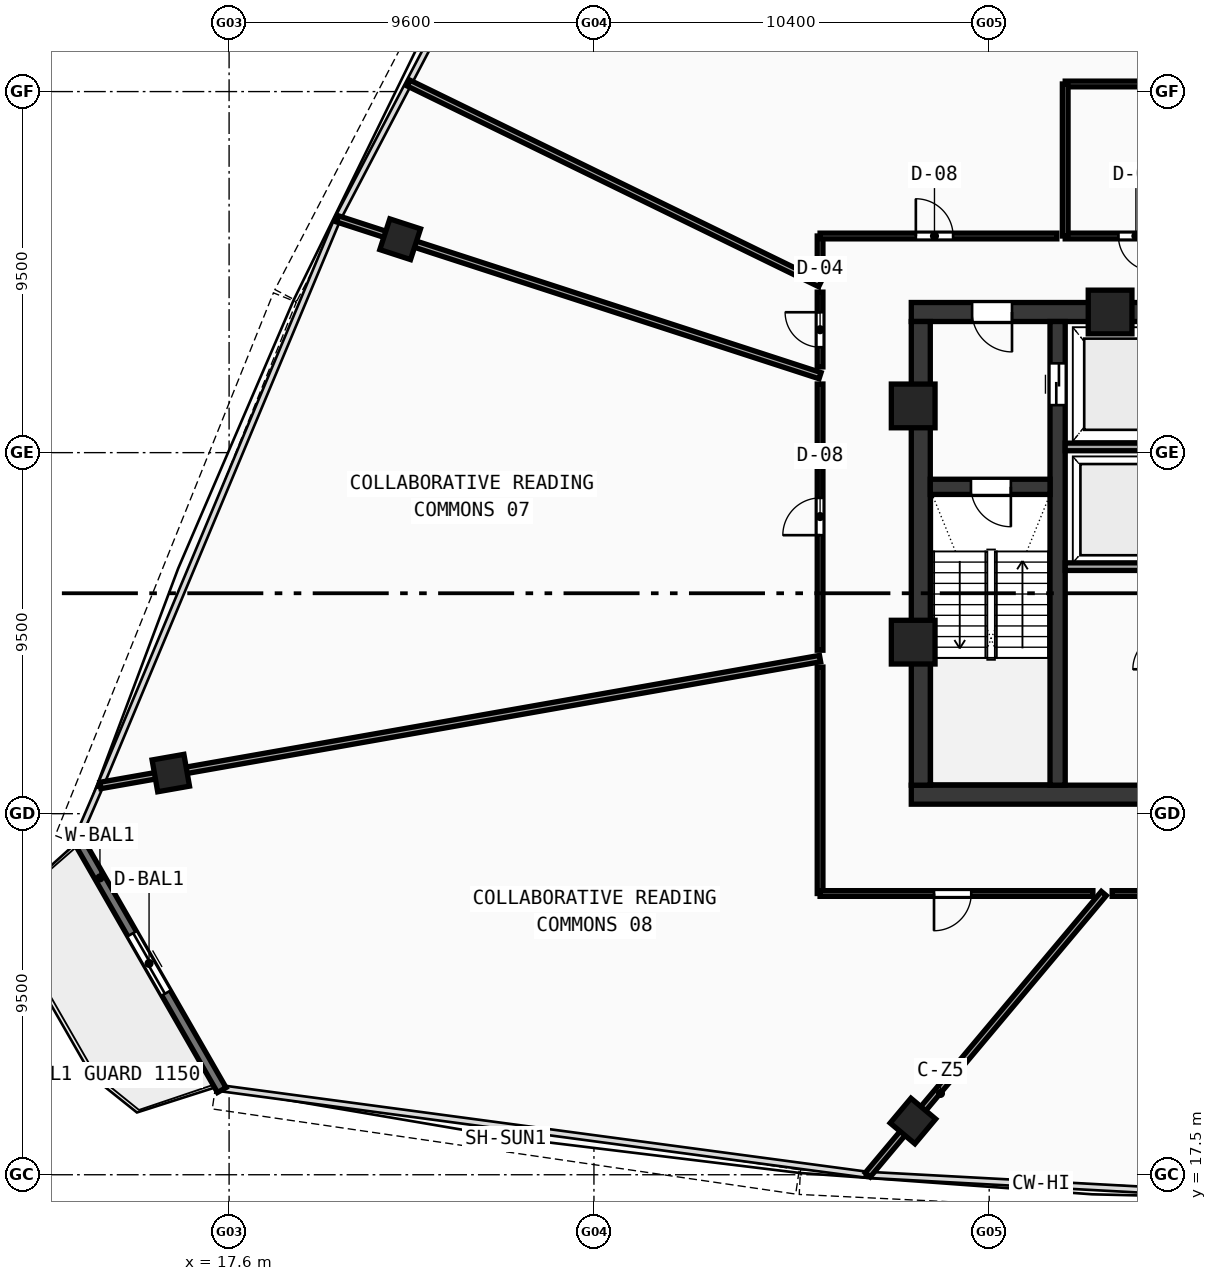
"""IFC4 building model, lengths in metres.
Left out: names, types, materials, properties, quantities, classifications, styles, units other than length and angle.
Written with IfcOpenShell. Run it as: python <this file> out.ifc"""

import sys

from ifc_helpers import new_model, si_unit, direction, frame, frame_2d, origin, origin_with_axes, origin_2d, place, context, subcontext, project, spatial, rectangle, hollow_rectangle, extrude, source, transform, mapped, element, fill, save


model = new_model("IFC4")
c1 = context("Model", 3, precision=1e-05, world=origin(), true_north=direction((0.0, 1.0)))
c2 = subcontext(c1, "Body", "Model", "MODEL_VIEW")
j1 = project(units=[si_unit("LENGTHUNIT", "METRE"), si_unit("PLANEANGLEUNIT", "RADIAN")], contexts=[c1])
p1 = place(None, origin())
s1 = spatial("IfcSite", under=j1, at=p1, CompositionType="ELEMENT")
p2 = place(p1, origin())
s2 = spatial("IfcBuilding", under=s1, at=p2, CompositionType="ELEMENT")
p3 = place(p2, frame((0.0, 0.0, 251.99)))
s3 = spatial("IfcBuildingStorey", under=s2, at=p3, CompositionType="ELEMENT", Elevation=251.99)
p4 = place(p3, frame((35.55, 27.5, 0.0), z_axis=(0.0, 0.0, 1.0), x_axis=(1.0, 0.0, 0.0)))
e1 = element("IfcWall", 1, at=p4, inside=s3, PredefinedType="SHEAR", context=c2, shape_type="SweptSolid", body=[
    extrude(rectangle(XDim=24.9, YDim=0.5, at=frame_2d((12.45, 0.0))), origin(), (0.0, 0.0, 1.0), 3.47),
])
p5 = place(p3, frame((35.55, 40.2, 0.0), z_axis=(0.0, 0.0, 1.0), x_axis=(1.0, 0.0, 0.0)))
e2 = element("IfcWall", 2, at=p5, inside=s3, PredefinedType="SHEAR", context=c2, shape_type="SweptSolid", body=[
    extrude(rectangle(XDim=11.25, YDim=0.5, at=frame_2d((5.625, 0.0))), origin(), (0.0, 0.0, 1.0), 3.47),
])
p6 = place(p5, frame((1.6, 0.0, 0.0)))
e3 = element("IfcOpeningElement", 3, at=p6, cuts=e2, PredefinedType="OPENING", context=c2, shape_type="SweptSolid", body=[
    extrude(rectangle(XDim=1.05, YDim=2.1, at=frame_2d((0.525, 1.05))), frame((0.0, 0.26, 0.0), z_axis=(0.0, -1.0, 0.0), x_axis=(1.0, 0.0, 0.0)), (0.0, 0.0, 1.0), 0.52),
])
p7 = place(p3, frame((35.8, 27.75, 0.0), z_axis=(0.0, 0.0, 1.0), x_axis=(0.0, 1.0, 0.0)))
e4 = element("IfcWall", 4, at=p7, inside=s3, PredefinedType="SHEAR", context=c2, shape_type="SweptSolid", body=[
    extrude(rectangle(XDim=12.2, YDim=0.5, at=frame_2d((6.1, 0.0))), origin(), (0.0, 0.0, 1.0), 3.47),
])
p8 = place(p3, frame((39.4, 27.75, 0.0), z_axis=(0.0, 0.0, 1.0), x_axis=(0.0, 1.0, 0.0)))
e5 = element("IfcWall", 5, at=p8, inside=s3, PredefinedType="SHEAR", context=c2, shape_type="SweptSolid", body=[
    extrude(rectangle(XDim=12.2, YDim=0.4, at=frame_2d((6.1, 0.0))), origin(), (0.0, 0.0, 1.0), 3.47),
])
p9 = place(p8, frame((10.0, 0.0, 0.0)))
e6 = element("IfcOpeningElement", 6, at=p9, cuts=e5, PredefinedType="OPENING", context=c2, shape_type="SweptSolid", body=[
    extrude(rectangle(XDim=1.1, YDim=2.1, at=frame_2d((0.55, 1.05))), frame((0.0, 0.21, 0.0), z_axis=(0.0, -1.0, 0.0), x_axis=(1.0, 0.0, 0.0)), (0.0, 0.0, 1.0), 0.42),
])
p10 = place(p3, frame((36.05, 35.6, 0.0), z_axis=(0.0, 0.0, 1.0), x_axis=(1.0, 0.0, 0.0)))
e7 = element("IfcWall", 7, at=p10, inside=s3, PredefinedType="SHEAR", context=c2, shape_type="SweptSolid", body=[
    extrude(rectangle(XDim=3.15, YDim=0.4, at=frame_2d((1.575, 0.0))), origin(), (0.0, 0.0, 1.0), 3.47),
])
p11 = place(p10, frame((1.07, 0.0, 0.0)))
e8 = element("IfcOpeningElement", 8, at=p11, cuts=e7, PredefinedType="OPENING", context=c2, shape_type="SweptSolid", body=[
    extrude(rectangle(XDim=1.05, YDim=2.1, at=frame_2d((0.525, 1.05))), frame((0.0, 0.21, 0.0), z_axis=(0.0, -1.0, 0.0), x_axis=(1.0, 0.0, 0.0)), (0.0, 0.0, 1.0), 0.42),
])
m1 = source(origin(), c2, "Body", "SweptSolid", [
    extrude(hollow_rectangle(XDim=1.15, YDim=1.15, WallThickness=0.048, at=origin_2d()), origin(), (0.0, 0.0, 1.0), 3.73),
])
for number, where, z_axis, x_axis in (
    (9, (40.781, 40.2, -0.26), (0.0, 0.0, 1.0), (1.0, 0.0, 0.0)),
    (10, (35.6, 37.729, -0.26), (0.0, 0.0, 1.0), (1.0, 0.0, 0.0)),
    (11, (35.6, 31.513, -0.26), (0.0, 0.0, 1.0), (1.0, 0.0, 0.0)),
):
    element("IfcColumn", number, at=place(p3, frame(where, z_axis=z_axis, x_axis=x_axis)), inside=s3, PredefinedType="COLUMN", context=c2, shape_type="MappedRepresentation", body=[
        mapped(m1, transform((0.0, 0.0, 0.0), scale=1.0)),
    ])
m2 = source(origin(), c2, "Body", "SweptSolid", [
    extrude(hollow_rectangle(XDim=0.85, YDim=0.85, WallThickness=0.034, at=origin_2d()), origin(), (0.0, 0.0, 1.0), 3.73),
])
for number, where, z_axis, x_axis in (
    (12, (35.593, 18.914, -0.26), (0.0, 0.0, 1.0), (0.766, -0.643, 0.0)),
    (13, (22.102, 42.115, -0.26), (0.0, 0.0, 1.0), (-0.309, -0.951, 0.0)),
    (14, (16.066, 28.069, -0.26), (0.0, 0.0, 1.0), (0.174, -0.985, 0.0)),
):
    element("IfcColumn", number, at=place(p3, frame(where, z_axis=z_axis, x_axis=x_axis)), inside=s3, PredefinedType="COLUMN", context=c2, shape_type="MappedRepresentation", body=[
        mapped(m2, transform((0.0, 0.0, 0.0), scale=1.0)),
    ])
p12 = place(p3, frame((13.581, 26.392, 0.0), z_axis=(0.0, 0.0, 1.0), x_axis=(0.497934343816, -0.867214730761, 0.0)))
e15 = element("IfcWall", 15, at=p12, inside=s3, PredefinedType="STANDARD", context=c2, shape_type="SweptSolid", body=[
    extrude(rectangle(XDim=7.684, YDim=0.26, at=frame_2d((3.842, 0.0))), origin(), (0.0, 0.0, 1.0), 3.47),
])
p13 = place(p12, frame((2.942, 0.0, 0.0)))
e16 = element("IfcOpeningElement", 16, at=p13, cuts=e15, PredefinedType="OPENING", context=c2, shape_type="SweptSolid", body=[
    extrude(rectangle(XDim=1.8, YDim=2.15, at=frame_2d((0.9, 1.075))), frame((0.0, 0.14, 0.0), z_axis=(0.0, -1.0, 0.0), x_axis=(1.0, 0.0, 0.0)), (0.0, 0.0, 1.0), 0.28),
])
for number, where, z_axis, x_axis in (
    (17, (39.6, 36.65, 0.0), (0.0, 0.0, 1.0), (1.0, 0.0, 0.0)),
    (18, (39.6, 33.5, 0.0), (0.0, 0.0, 1.0), (1.0, 0.0, 0.0)),
):
    element("IfcWall", number, at=place(p3, frame(where, z_axis=z_axis, x_axis=x_axis)), inside=s3, PredefinedType="SOLIDWALL", context=c2, shape_type="SweptSolid", body=[
        extrude(rectangle(XDim=2.72, YDim=0.2, at=frame_2d((1.36, 0.0))), origin(), (0.0, 0.0, 1.0), 3.47),
    ])
p14 = place(p3, frame((39.6, 42.2, 0.0), z_axis=(0.0, 0.0, 1.0), x_axis=(1.0, 0.0, 0.0)))
e19 = element("IfcWall", 19, at=p14, inside=s3, PredefinedType="PARTITIONING", context=c2, shape_type="SweptSolid", body=[
    extrude(rectangle(XDim=4.35, YDim=0.15, at=frame_2d((2.175, 0.0))), origin(), (0.0, 0.0, 1.0), 3.47),
])
p15 = place(p14, frame((1.4, 0.0, 0.0)))
e20 = element("IfcOpeningElement", 20, at=p15, cuts=e19, PredefinedType="OPENING", context=c2, shape_type="SweptSolid", body=[
    extrude(rectangle(XDim=0.92, YDim=2.1, at=frame_2d((0.46, 1.05))), frame((0.0, 0.085, 0.0), z_axis=(0.0, -1.0, 0.0), x_axis=(1.0, 0.0, 0.0)), (0.0, 0.0, 1.0), 0.17),
])
p16 = place(p3, frame((39.6, 46.2, 0.0), z_axis=(0.0, 0.0, 1.0), x_axis=(1.0, 0.0, 0.0)))
e21 = element("IfcWall", 21, at=p16, inside=s3, PredefinedType="PARTITIONING", context=c2, shape_type="SweptSolid", body=[
    extrude(rectangle(XDim=4.35, YDim=0.15, at=frame_2d((2.175, 0.0))), origin(), (0.0, 0.0, 1.0), 2.82),
])
p17 = place(p3, frame((39.6, 42.2, 0.0), z_axis=(0.0, 0.0, 1.0), x_axis=(0.0, 1.0, 0.0)))
e22 = element("IfcWall", 22, at=p17, inside=s3, PredefinedType="PARTITIONING", context=c2, shape_type="SweptSolid", body=[
    extrude(rectangle(XDim=4.0, YDim=0.15, at=frame_2d((2.0, 0.0))), origin(), (0.0, 0.0, 1.0), 3.47),
])
p18 = place(p3, frame((42.435, 46.2, 0.0), z_axis=(0.0, 0.0, 1.0), x_axis=(-0.406732494706, 0.913547304605, 0.0)))
e23 = element("IfcWall", 23, at=p18, inside=s3, PredefinedType="PARTITIONING", context=c2, shape_type="SweptSolid", body=[
    extrude(rectangle(XDim=21.123, YDim=0.17, at=frame_2d((10.562, 0.0))), origin(), (0.0, 0.0, 1.0), 2.82),
])
p19 = place(p3, frame((33.15, 40.943, 0.0), z_axis=(0.0, 0.0, 1.0), x_axis=(-0.89879494126, 0.438369311842, 0.0)))
e24 = element("IfcWall", 24, at=p19, inside=s3, PredefinedType="PARTITIONING", context=c2, shape_type="SweptSolid", body=[
    extrude(rectangle(XDim=12.043, YDim=0.17, at=frame_2d((6.021, 0.0))), origin(), (0.0, 0.0, 1.0), 2.82),
])
p20 = place(p3, frame((33.15, 38.525, 0.0), z_axis=(0.0, 0.0, 1.0), x_axis=(-0.951055435747, 0.30902031994, 0.0)))
e25 = element("IfcWall", 25, at=p20, inside=s3, PredefinedType="PARTITIONING", context=c2, shape_type="SweptSolid", body=[
    extrude(rectangle(XDim=13.349, YDim=0.17, at=frame_2d((6.675, 0.0))), origin(), (0.0, 0.0, 1.0), 2.82),
])
p21 = place(p3, frame((33.15, 31.082, 0.0), z_axis=(0.0, 0.0, 1.0), x_axis=(-0.984808346381, -0.173644812474, 0.0)))
e26 = element("IfcWall", 26, at=p21, inside=s3, PredefinedType="PARTITIONING", context=c2, shape_type="SweptSolid", body=[
    extrude(rectangle(XDim=19.228, YDim=0.17, at=frame_2d((9.614, 0.0))), origin(), (0.0, 0.0, 1.0), 2.82),
])
p22 = place(p3, frame((40.616, 24.9, 0.0), z_axis=(0.0, 0.0, 1.0), x_axis=(-0.642795010628, -0.766038232931, 0.0)))
e27 = element("IfcWall", 27, at=p22, inside=s3, PredefinedType="PARTITIONING", context=c2, shape_type="SweptSolid", body=[
    extrude(rectangle(XDim=9.663, YDim=0.17, at=frame_2d((4.832, 0.0))), origin(), (0.0, 0.0, 1.0), 2.82),
])
p23 = place(p3, frame((33.15, 24.9, 0.0), z_axis=(0.0, 0.0, 1.0), x_axis=(0.0, 1.0, 0.0)))
e28 = element("IfcWall", 28, at=p23, inside=s3, PredefinedType="PARTITIONING", context=c2, shape_type="SweptSolid", body=[
    extrude(rectangle(XDim=5.958, YDim=0.15, at=frame_2d((2.979, 0.0))), origin(), (0.0, 0.0, 1.0), 3.12),
])
p24 = place(p3, frame((33.15, 31.301, 0.0), z_axis=(0.0, 0.0, 1.0), x_axis=(0.0, 1.0, 0.0)))
e29 = element("IfcWall", 29, at=p24, inside=s3, PredefinedType="PARTITIONING", context=c2, shape_type="SweptSolid", body=[
    extrude(rectangle(XDim=7.004, YDim=0.15, at=frame_2d((3.502, 0.0))), origin(), (0.0, 0.0, 1.0), 3.47),
])
p25 = place(p24, frame((3.027, 0.0, 0.0)))
e30 = element("IfcOpeningElement", 30, at=p25, cuts=e29, PredefinedType="OPENING", context=c2, shape_type="SweptSolid", body=[
    extrude(rectangle(XDim=0.98, YDim=2.12, at=frame_2d((0.49, 1.06))), frame((0.0, 0.085, 0.0), z_axis=(0.0, -1.0, 0.0), x_axis=(1.0, 0.0, 0.0)), (0.0, 0.0, 1.0), 0.17),
])
p26 = place(p3, frame((33.15, 38.756, 0.0), z_axis=(0.0, 0.0, 1.0), x_axis=(0.0, 1.0, 0.0)))
e31 = element("IfcWall", 31, at=p26, inside=s3, PredefinedType="PARTITIONING", context=c2, shape_type="SweptSolid", body=[
    extrude(rectangle(XDim=1.967, YDim=0.15, at=frame_2d((0.983, 0.0))), origin(), (0.0, 0.0, 1.0), 3.47),
])
p27 = place(p26, frame((0.518, 0.0, 0.0)))
e32 = element("IfcOpeningElement", 32, at=p27, cuts=e31, PredefinedType="OPENING", context=c2, shape_type="SweptSolid", body=[
    extrude(rectangle(XDim=0.92, YDim=2.1, at=frame_2d((0.46, 1.05))), frame((0.0, 0.085, 0.0), z_axis=(0.0, -1.0, 0.0), x_axis=(1.0, 0.0, 0.0)), (0.0, 0.0, 1.0), 0.17),
])
p28 = place(p3, frame((33.15, 41.188, 0.0), z_axis=(0.0, 0.0, 1.0), x_axis=(0.0, 1.0, 0.0)))
e33 = element("IfcWall", 33, at=p28, inside=s3, PredefinedType="PARTITIONING", context=c2, shape_type="SweptSolid", body=[
    extrude(rectangle(XDim=1.012, YDim=0.15, at=frame_2d((0.506, 0.0))), origin(), (0.0, 0.0, 1.0), 3.12),
])
p29 = place(p3, frame((33.15, 42.2, 0.0), z_axis=(0.0, 0.0, 1.0), x_axis=(1.0, 0.0, 0.0)))
e34 = element("IfcWall", 34, at=p29, inside=s3, PredefinedType="PARTITIONING", context=c2, shape_type="SweptSolid", body=[
    extrude(rectangle(XDim=6.23, YDim=0.15, at=frame_2d((3.115, 0.0))), origin(), (0.0, 0.0, 1.0), 2.82),
])
p30 = place(p29, frame((2.52, 0.0, 0.0)))
e35 = element("IfcOpeningElement", 35, at=p30, cuts=e34, PredefinedType="OPENING", context=c2, shape_type="SweptSolid", body=[
    extrude(rectangle(XDim=0.98, YDim=2.12, at=frame_2d((0.49, 1.06))), frame((0.0, 0.085, 0.0), z_axis=(0.0, -1.0, 0.0), x_axis=(1.0, 0.0, 0.0)), (0.0, 0.0, 1.0), 0.17),
])
p31 = place(p3, frame((45.414, 24.9, 0.0), z_axis=(0.0, 0.0, 1.0), x_axis=(-1.0, 0.0, 0.0)))
e36 = element("IfcWall", 36, at=p31, inside=s3, PredefinedType="PARTITIONING", context=c2, shape_type="SweptSolid", body=[
    extrude(rectangle(XDim=4.579, YDim=0.15, at=frame_2d((2.289, 0.0))), origin(), (0.0, 0.0, 1.0), 2.82),
])
p32 = place(p31, frame((1.81, 0.0, 0.0)))
e37 = element("IfcOpeningElement", 37, at=p32, cuts=e36, PredefinedType="OPENING", context=c2, shape_type="SweptSolid", body=[
    extrude(rectangle(XDim=0.98, YDim=2.12, at=frame_2d((0.49, 1.06))), frame((0.0, 0.085, 0.0), z_axis=(0.0, -1.0, 0.0), x_axis=(1.0, 0.0, 0.0)), (0.0, 0.0, 1.0), 0.17),
])
p33 = place(p3, frame((40.329, 24.9, 0.0), z_axis=(0.0, 0.0, 1.0), x_axis=(-1.0, 0.0, 0.0)))
e38 = element("IfcWall", 38, at=p33, inside=s3, PredefinedType="PARTITIONING", context=c2, shape_type="SweptSolid", body=[
    extrude(rectangle(XDim=7.179, YDim=0.15, at=frame_2d((3.589, 0.0))), origin(), (0.0, 0.0, 1.0), 3.12),
])
p34 = place(p33, frame((3.201, 0.0, 0.0)))
e39 = element("IfcOpeningElement", 39, at=p34, cuts=e38, PredefinedType="OPENING", context=c2, shape_type="SweptSolid", body=[
    extrude(rectangle(XDim=0.98, YDim=2.12, at=frame_2d((0.49, 1.06))), frame((0.0, 0.085, 0.0), z_axis=(0.0, -1.0, 0.0), x_axis=(1.0, 0.0, 0.0)), (0.0, 0.0, 1.0), 0.17),
])
m3 = source(origin(), c2, "Body", "SweptSolid", [
    extrude(rectangle(XDim=1.8, YDim=2.15, at=frame_2d((0.9, 1.075))), frame((0.0, 0.025, 0.0), z_axis=(0.0, -1.0, 0.0), x_axis=(1.0, 0.0, 0.0)), (0.0, 0.0, 1.0), 0.05),
])
p35 = place(p13, origin_with_axes())
e40 = element("IfcDoor", 40, at=p35, inside=s3, OperationType="DOUBLE_DOOR_SLIDING", PredefinedType="DOOR", context=c2, shape_type="MappedRepresentation", body=[
    mapped(m3, transform((0.0, 0.0, 0.0), scale=1.0)),
])
fill(e16, e40)
m4 = source(origin(), c2, "Body", "SweptSolid", [
    extrude(rectangle(XDim=1.05, YDim=2.1, at=frame_2d((0.525, 1.05))), frame((0.0, 0.025, 0.0), z_axis=(0.0, -1.0, 0.0), x_axis=(1.0, 0.0, 0.0)), (0.0, 0.0, 1.0), 0.05),
])
p36 = place(p11, frame((1.05, 0.0, 0.0), z_axis=(0.0, 0.0, 1.0), x_axis=(-1.0, 0.0, 0.0)))
e41 = element("IfcDoor", 41, at=p36, inside=s3, OperationType="SINGLE_SWING_LEFT", PredefinedType="DOOR", context=c2, shape_type="MappedRepresentation", body=[
    mapped(m4, transform((0.0, 0.0, 0.0), scale=1.0)),
])
fill(e8, e41)
p37 = place(p6, frame((1.05, 0.0, 0.0), z_axis=(0.0, 0.0, 1.0), x_axis=(-1.0, 0.0, 0.0)))
e42 = element("IfcDoor", 42, at=p37, inside=s3, OperationType="SINGLE_SWING_LEFT", PredefinedType="DOOR", context=c2, shape_type="MappedRepresentation", body=[
    mapped(m4, transform((0.0, 0.0, 0.0), scale=1.0)),
])
fill(e3, e42)
m5 = source(origin(), c2, "Body", "SweptSolid", [
    extrude(rectangle(XDim=1.1, YDim=2.1, at=frame_2d((0.55, 1.05))), frame((0.0, 0.025, 0.0), z_axis=(0.0, -1.0, 0.0), x_axis=(1.0, 0.0, 0.0)), (0.0, 0.0, 1.0), 0.05),
])
p38 = place(p9, frame((1.1, 0.0, 0.0), z_axis=(0.0, 0.0, 1.0), x_axis=(-1.0, 0.0, 0.0)))
e43 = element("IfcDoor", 43, at=p38, inside=s3, OperationType="DOUBLE_DOOR_SLIDING", PredefinedType="DOOR", context=c2, shape_type="MappedRepresentation", body=[
    mapped(m5, transform((0.0, 0.0, 0.0), scale=1.0)),
])
fill(e6, e43)
m6 = source(origin(), c2, "Body", "SweptSolid", [
    extrude(rectangle(XDim=0.92, YDim=2.1, at=frame_2d((0.46, 1.05))), frame((0.0, 0.025, 0.0), z_axis=(0.0, -1.0, 0.0), x_axis=(1.0, 0.0, 0.0)), (0.0, 0.0, 1.0), 0.05),
])
p39 = place(p15, frame((0.92, 0.0, 0.0), z_axis=(0.0, 0.0, 1.0), x_axis=(-1.0, 0.0, 0.0)))
e44 = element("IfcDoor", 44, at=p39, inside=s3, OperationType="SINGLE_SWING_LEFT", PredefinedType="DOOR", context=c2, shape_type="MappedRepresentation", body=[
    mapped(m6, transform((0.0, 0.0, 0.0), scale=1.0)),
])
fill(e20, e44)
m7 = source(origin(), c2, "Body", "SweptSolid", [
    extrude(rectangle(XDim=0.98, YDim=2.12, at=frame_2d((0.49, 1.06))), frame((0.0, 0.025, 0.0), z_axis=(0.0, -1.0, 0.0), x_axis=(1.0, 0.0, 0.0)), (0.0, 0.0, 1.0), 0.05),
])
p40 = place(p30, origin_with_axes())
e45 = element("IfcDoor", 45, at=p40, inside=s3, OperationType="SINGLE_SWING_LEFT", PredefinedType="DOOR", context=c2, shape_type="MappedRepresentation", body=[
    mapped(m7, transform((0.0, 0.0, 0.0), scale=1.0)),
])
fill(e35, e45)
p41 = place(p27, origin_with_axes())
e46 = element("IfcDoor", 46, at=p41, inside=s3, OperationType="SINGLE_SWING_RIGHT", PredefinedType="DOOR", context=c2, shape_type="MappedRepresentation", body=[
    mapped(m6, transform((0.0, 0.0, 0.0), scale=1.0)),
])
fill(e32, e46)
p42 = place(p25, origin_with_axes())
e47 = element("IfcDoor", 47, at=p42, inside=s3, OperationType="SINGLE_SWING_LEFT", PredefinedType="DOOR", context=c2, shape_type="MappedRepresentation", body=[
    mapped(m7, transform((0.0, 0.0, 0.0), scale=1.0)),
])
fill(e30, e47)
p43 = place(p34, origin_with_axes())
e48 = element("IfcDoor", 48, at=p43, inside=s3, OperationType="SINGLE_SWING_RIGHT", PredefinedType="DOOR", context=c2, shape_type="MappedRepresentation", body=[
    mapped(m7, transform((0.0, 0.0, 0.0), scale=1.0)),
])
fill(e39, e48)
save(model, sys.argv[1])
